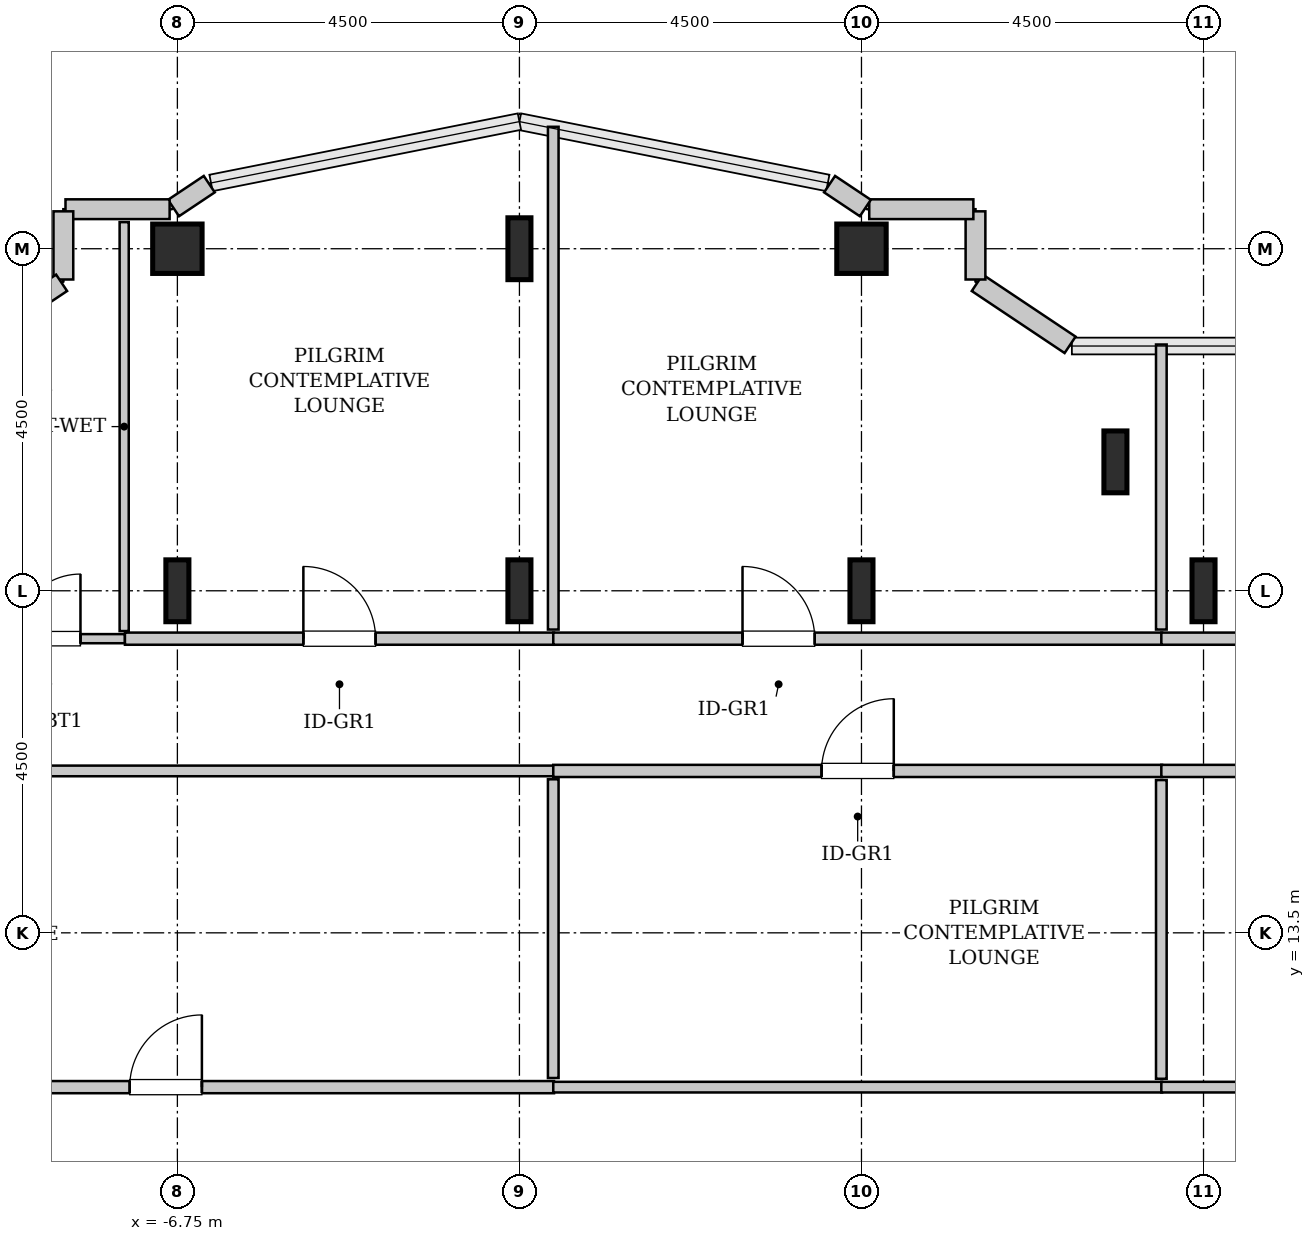
"""IFC4 building model, lengths in metres.
Left out: names, types, materials, properties, quantities, classifications, styles, units other than length and angle.
Written with IfcOpenShell. Run it as: python <this file> out.ifc"""

import sys

from ifc_helpers import new_model, si_unit, direction, frame, frame_2d, origin, origin_2d, place, context, subcontext, project, spatial, rectangle, hollow_rectangle, i_section, extrude, source, transform, mapped, element, fill, save


model = new_model("IFC4")
c1 = context("Model", 3, precision=1e-05, world=origin(), true_north=direction((0.0, 1.0)))
c2 = subcontext(c1, "Body", "Model", "MODEL_VIEW")
j1 = project(units=[si_unit("LENGTHUNIT", "METRE"), si_unit("PLANEANGLEUNIT", "RADIAN")], contexts=[c1])
p1 = place(None, origin())
s1 = spatial("IfcSite", under=j1, at=p1, CompositionType="ELEMENT")
p2 = place(p1, origin())
s2 = spatial("IfcBuilding", under=s1, at=p2, CompositionType="ELEMENT")
p3 = place(p2, frame((0.0, 0.0, 237.0)))
s3 = spatial("IfcBuildingStorey", under=s2, at=p3, CompositionType="ELEMENT", Elevation=237.0)
m1 = source(origin(), c2, "Body", "SweptSolid", [
    extrude(i_section(OverallWidth=0.303, OverallDepth=0.814, WebThickness=0.021, FlangeThickness=0.04, FilletRadius=0.03, at=origin_2d()), origin(), (0.0, 0.0, 1.0), 3.8),
])
p4 = place(p3, frame((-6.75, 18.0, 0.0), z_axis=(0.0, 0.0, 1.0), x_axis=(1.0, 0.0, 0.0)))
e1 = element("IfcColumn", 1, at=p4, inside=s3, PredefinedType="COLUMN", context=c2, shape_type="MappedRepresentation", body=[
    mapped(m1, transform((0.0, 0.0, 0.0), x_axis=(1.0, 0.0, 0.0), y_axis=(0.0, 1.0, 0.0), z_axis=(0.0, 0.0, 1.0), scale=1.0)),
])
m2 = source(origin(), c2, "Body", "SweptSolid", [
    extrude(hollow_rectangle(XDim=0.65, YDim=0.65, WallThickness=0.032, InnerFilletRadius=0.032, OuterFilletRadius=0.064, at=origin_2d()), origin(), (0.0, 0.0, 1.0), 3.8),
])
p5 = place(p3, frame((-6.75, 22.5, 0.0), z_axis=(0.0, 0.0, 1.0), x_axis=(1.0, 0.0, 0.0)))
e2 = element("IfcColumn", 2, at=p5, inside=s3, PredefinedType="COLUMN", context=c2, shape_type="MappedRepresentation", body=[
    mapped(m2, transform((0.0, 0.0, 0.0), x_axis=(1.0, 0.0, 0.0), y_axis=(0.0, 1.0, 0.0), z_axis=(0.0, 0.0, 1.0), scale=1.0)),
])
for number, where, z_axis, x_axis in (
    (3, (-2.25, 18.0, 0.0), (0.0, 0.0, 1.0), (1.0, 0.0, 0.0)),
    (4, (-2.25, 22.5, 0.0), (0.0, 0.0, 1.0), (1.0, 0.0, 0.0)),
    (5, (2.25, 18.0, 0.0), (0.0, 0.0, 1.0), (1.0, 0.0, 0.0)),
):
    element("IfcColumn", number, at=place(p3, frame(where, z_axis=z_axis, x_axis=x_axis)), inside=s3, PredefinedType="COLUMN", context=c2, shape_type="MappedRepresentation", body=[
        mapped(m1, transform((0.0, 0.0, 0.0), x_axis=(1.0, 0.0, 0.0), y_axis=(0.0, 1.0, 0.0), z_axis=(0.0, 0.0, 1.0), scale=1.0)),
    ])
p6 = place(p3, frame((2.25, 22.5, 0.0), z_axis=(0.0, 0.0, 1.0), x_axis=(1.0, 0.0, 0.0)))
e6 = element("IfcColumn", 6, at=p6, inside=s3, PredefinedType="COLUMN", context=c2, shape_type="MappedRepresentation", body=[
    mapped(m2, transform((0.0, 0.0, 0.0), x_axis=(1.0, 0.0, 0.0), y_axis=(0.0, 1.0, 0.0), z_axis=(0.0, 0.0, 1.0), scale=1.0)),
])
for number, where, z_axis, x_axis in (
    (7, (5.591, 19.696, 0.0), (0.0, 0.0, 1.0), (1.0, 0.0, 0.0)),
    (8, (6.75, 18.0, 0.0), (0.0, 0.0, 1.0), (1.0, 0.0, 0.0)),
):
    element("IfcColumn", number, at=place(p3, frame(where, z_axis=z_axis, x_axis=x_axis)), inside=s3, PredefinedType="COLUMN", context=c2, shape_type="MappedRepresentation", body=[
        mapped(m1, transform((0.0, 0.0, 0.0), x_axis=(1.0, 0.0, 0.0), y_axis=(0.0, 1.0, 0.0), z_axis=(0.0, 0.0, 1.0), scale=1.0)),
    ])
m3 = source(origin(), c2, "Body", "SweptSolid", [
    extrude(rectangle(XDim=1.469, YDim=0.26, at=frame_2d((0.734, 0.0))), origin(), (0.0, 0.0, 1.0), 3.55),
])
p7 = place(p3, frame((4.995, 21.236, 0.0), z_axis=(0.0, 0.0, 1.0), x_axis=(-0.831461760506, 0.555581983884, 0.0)))
e9 = element("IfcWall", 9, at=p7, inside=s3, PredefinedType="SOLIDWALL", context=c2, shape_type="MappedRepresentation", body=[
    mapped(m3, transform((0.0, 0.0, 0.0), x_axis=(1.0, 0.0, 0.0), y_axis=(0.0, 1.0, 0.0), z_axis=(0.0, 0.0, 1.0), scale=1.0)),
])
m4 = source(origin(), c2, "Body", "SweptSolid", [
    extrude(rectangle(XDim=0.897, YDim=0.26, at=frame_2d((0.448, 0.0))), origin(), (0.0, 0.0, 1.0), 3.55),
])
p8 = place(p3, frame((3.75, 22.095, 0.0), z_axis=(0.0, 0.0, 1.0), x_axis=(0.0, 1.0, 0.0)))
e10 = element("IfcWall", 10, at=p8, inside=s3, PredefinedType="SOLIDWALL", context=c2, shape_type="MappedRepresentation", body=[
    mapped(m4, transform((0.0, 0.0, 0.0), x_axis=(1.0, 0.0, 0.0), y_axis=(0.0, 1.0, 0.0), z_axis=(0.0, 0.0, 1.0), scale=1.0)),
])
m5 = source(origin(), c2, "Body", "SweptSolid", [
    extrude(rectangle(XDim=1.37, YDim=0.26, at=frame_2d((0.685, 0.0))), origin(), (0.0, 0.0, 1.0), 3.55),
])
p9 = place(p3, frame((3.722, 23.02, 0.0), z_axis=(0.0, 0.0, 1.0), x_axis=(-1.0, 0.0, 0.0)))
e11 = element("IfcWall", 11, at=p9, inside=s3, PredefinedType="SOLIDWALL", context=c2, shape_type="MappedRepresentation", body=[
    mapped(m5, transform((0.0, 0.0, 0.0), x_axis=(1.0, 0.0, 0.0), y_axis=(0.0, 1.0, 0.0), z_axis=(0.0, 0.0, 1.0), scale=1.0)),
])
m6 = source(origin(), c2, "Body", "SweptSolid", [
    extrude(rectangle(XDim=0.565, YDim=0.26, at=frame_2d((0.283, 0.0))), origin(), (0.0, 0.0, 1.0), 3.55),
])
for number, where, z_axis, x_axis in (
    (12, (2.301, 23.036, 0.0), (0.0, 0.0, 1.0), (-0.832, 0.555, 0.0)),
    (13, (-6.331, 23.35, 0.0), (0.0, 0.0, 1.0), (-0.832, -0.555, 0.0)),
):
    element("IfcWall", number, at=place(p3, frame(where, z_axis=z_axis, x_axis=x_axis)), inside=s3, PredefinedType="SOLIDWALL", context=c2, shape_type="MappedRepresentation", body=[
        mapped(m6, transform((0.0, 0.0, 0.0), x_axis=(1.0, 0.0, 0.0), y_axis=(0.0, 1.0, 0.0), z_axis=(0.0, 0.0, 1.0), scale=1.0)),
    ])
p10 = place(p3, frame((-6.852, 23.02, 0.0), z_axis=(0.0, 0.0, 1.0), x_axis=(-1.0, 0.0, 0.0)))
e14 = element("IfcWall", 14, at=p10, inside=s3, PredefinedType="SOLIDWALL", context=c2, shape_type="MappedRepresentation", body=[
    mapped(m5, transform((0.0, 0.0, 0.0), x_axis=(1.0, 0.0, 0.0), y_axis=(0.0, 1.0, 0.0), z_axis=(0.0, 0.0, 1.0), scale=1.0)),
])
p11 = place(p3, frame((-8.25, 22.992, 0.0), z_axis=(0.0, 0.0, 1.0), x_axis=(0.0, -1.0, 0.0)))
e15 = element("IfcWall", 15, at=p11, inside=s3, PredefinedType="SOLIDWALL", context=c2, shape_type="MappedRepresentation", body=[
    mapped(m4, transform((0.0, 0.0, 0.0), x_axis=(1.0, 0.0, 0.0), y_axis=(0.0, 1.0, 0.0), z_axis=(0.0, 0.0, 1.0), scale=1.0)),
])
p12 = place(p3, frame((-8.273, 22.052, 0.0), z_axis=(0.0, 0.0, 1.0), x_axis=(-0.831461760506, -0.555581983884, 0.0)))
e16 = element("IfcWall", 16, at=p12, inside=s3, PredefinedType="SOLIDWALL", context=c2, shape_type="MappedRepresentation", body=[
    mapped(m3, transform((0.0, 0.0, 0.0), x_axis=(1.0, 0.0, 0.0), y_axis=(0.0, 1.0, 0.0), z_axis=(0.0, 0.0, 1.0), scale=1.0)),
])
m7 = source(origin(), c2, "Body", "SweptSolid", [
    extrude(rectangle(XDim=2.02, YDim=0.12, at=frame_2d((1.01, 0.0))), origin(), (0.0, 0.0, 1.0), 3.535),
])
p13 = place(p3, frame((-9.46, 17.37, 0.0), z_axis=(0.0, 0.0, 1.0), x_axis=(1.0, 0.0, 0.0)))
e17 = element("IfcWall", 17, at=p13, inside=s3, PredefinedType="PLUMBINGWALL", context=c2, shape_type="MappedRepresentation", body=[
    mapped(m7, transform((0.0, 0.0, 0.0), x_axis=(1.0, 0.0, 0.0), y_axis=(0.0, 1.0, 0.0), z_axis=(0.0, 0.0, 1.0), scale=1.0)),
])
p14 = place(p13, frame((0.585, 0.0, 0.0)))
e18 = element("IfcOpeningElement", 18, at=p14, cuts=e17, PredefinedType="OPENING", context=c2, shape_type="SweptSolid", body=[
    extrude(rectangle(XDim=0.85, YDim=2.1, at=frame_2d((0.425, 1.05))), frame((0.0, 0.07, 0.0), z_axis=(0.0, -1.0, 0.0), x_axis=(1.0, 0.0, 0.0)), (0.0, 0.0, 1.0), 0.14),
])
m8 = source(origin(), c2, "Body", "SweptSolid", [
    extrude(rectangle(XDim=5.38, YDim=0.12, at=frame_2d((2.69, 0.0))), origin(), (0.0, 0.0, 1.0), 3.535),
])
p15 = place(p3, frame((-7.45, 17.47, 0.0), z_axis=(0.0, 0.0, 1.0), x_axis=(0.0, 1.0, 0.0)))
e19 = element("IfcWall", 19, at=p15, inside=s3, PredefinedType="PLUMBINGWALL", context=c2, shape_type="MappedRepresentation", body=[
    mapped(m8, transform((0.0, 0.0, 0.0), x_axis=(1.0, 0.0, 0.0), y_axis=(0.0, 1.0, 0.0), z_axis=(0.0, 0.0, 1.0), scale=1.0)),
])
m9 = source(origin(), c2, "Body", "SweptSolid", [
    extrude(rectangle(XDim=10.215, YDim=0.16, at=frame_2d((5.107, 0.0))), origin(), (0.0, 0.0, 1.0), 3.535),
])
p16 = place(p3, frame((-12.01, 11.47, 0.0), z_axis=(0.0, 0.0, 1.0), x_axis=(1.0, 0.0, 0.0)))
e20 = element("IfcWall", 20, at=p16, inside=s3, PredefinedType="PARTITIONING", context=c2, shape_type="MappedRepresentation", body=[
    mapped(m9, transform((0.0, 0.0, 0.0), x_axis=(1.0, 0.0, 0.0), y_axis=(0.0, 1.0, 0.0), z_axis=(0.0, 0.0, 1.0), scale=1.0)),
])
p17 = place(p16, frame((4.633, 0.0, 0.0)))
e21 = element("IfcOpeningElement", 21, at=p17, cuts=e20, PredefinedType="OPENING", context=c2, shape_type="SweptSolid", body=[
    extrude(rectangle(XDim=0.95, YDim=2.1, at=frame_2d((0.475, 1.05))), frame((0.0, 0.09, 0.0), z_axis=(0.0, -1.0, 0.0), x_axis=(1.0, 0.0, 0.0)), (0.0, 0.0, 1.0), 0.18),
])
m10 = source(origin(), c2, "Body", "SweptSolid", [
    extrude(rectangle(XDim=10.215, YDim=0.14, at=frame_2d((5.107, 0.0))), origin(), (0.0, 0.0, 1.0), 3.535),
])
p18 = place(p3, frame((-12.01, 15.63, 0.0), z_axis=(0.0, 0.0, 1.0), x_axis=(1.0, 0.0, 0.0)))
e22 = element("IfcWall", 22, at=p18, inside=s3, PredefinedType="PARTITIONING", context=c2, shape_type="MappedRepresentation", body=[
    mapped(m10, transform((0.0, 0.0, 0.0), x_axis=(1.0, 0.0, 0.0), y_axis=(0.0, 1.0, 0.0), z_axis=(0.0, 0.0, 1.0), scale=1.0)),
])
m11 = source(origin(), c2, "Body", "SweptSolid", [
    extrude(rectangle(XDim=3.93, YDim=0.14, at=frame_2d((1.965, 0.0))), origin(), (0.0, 0.0, 1.0), 3.535),
])
p19 = place(p3, frame((-1.805, 11.59, 0.0), z_axis=(0.0, 0.0, 1.0), x_axis=(0.0, 1.0, 0.0)))
e23 = element("IfcWall", 23, at=p19, inside=s3, PredefinedType="PARTITIONING", context=c2, shape_type="MappedRepresentation", body=[
    mapped(m11, transform((0.0, 0.0, 0.0), x_axis=(1.0, 0.0, 0.0), y_axis=(0.0, 1.0, 0.0), z_axis=(0.0, 0.0, 1.0), scale=1.0)),
])
m12 = source(origin(), c2, "Body", "SweptSolid", [
    extrude(rectangle(XDim=5.645, YDim=0.16, at=frame_2d((2.823, 0.0))), origin(), (0.0, 0.0, 1.0), 3.535),
])
p20 = place(p3, frame((-7.44, 17.37, 0.0), z_axis=(0.0, 0.0, 1.0), x_axis=(1.0, 0.0, 0.0)))
e24 = element("IfcWall", 24, at=p20, inside=s3, PredefinedType="PARTITIONING", context=c2, shape_type="MappedRepresentation", body=[
    mapped(m12, transform((0.0, 0.0, 0.0), x_axis=(1.0, 0.0, 0.0), y_axis=(0.0, 1.0, 0.0), z_axis=(0.0, 0.0, 1.0), scale=1.0)),
])
p21 = place(p20, frame((2.347, 0.0, 0.0)))
e25 = element("IfcOpeningElement", 25, at=p21, cuts=e24, PredefinedType="OPENING", context=c2, shape_type="SweptSolid", body=[
    extrude(rectangle(XDim=0.95, YDim=2.1, at=frame_2d((0.475, 1.05))), frame((0.0, 0.09, 0.0), z_axis=(0.0, -1.0, 0.0), x_axis=(1.0, 0.0, 0.0)), (0.0, 0.0, 1.0), 0.18),
])
m13 = source(origin(), c2, "Body", "SweptSolid", [
    extrude(rectangle(XDim=6.614, YDim=0.14, at=frame_2d((3.307, 0.0))), origin(), (0.0, 0.0, 1.0), 2.925),
])
p22 = place(p3, frame((-1.805, 17.49, 0.0), z_axis=(0.0, 0.0, 1.0), x_axis=(0.0, 1.0, 0.0)))
e26 = element("IfcWall", 26, at=p22, inside=s3, PredefinedType="PARTITIONING", context=c2, shape_type="MappedRepresentation", body=[
    mapped(m13, transform((0.0, 0.0, 0.0), x_axis=(1.0, 0.0, 0.0), y_axis=(0.0, 1.0, 0.0), z_axis=(0.0, 0.0, 1.0), scale=1.0)),
])
m14 = source(origin(), c2, "Body", "SweptSolid", [
    extrude(rectangle(XDim=8.01, YDim=0.16, at=frame_2d((4.005, 0.0))), origin(), (0.0, 0.0, 1.0), 3.535),
])
p23 = place(p3, frame((-1.805, 17.37, 0.0), z_axis=(0.0, 0.0, 1.0), x_axis=(1.0, 0.0, 0.0)))
e27 = element("IfcWall", 27, at=p23, inside=s3, PredefinedType="PARTITIONING", context=c2, shape_type="MappedRepresentation", body=[
    mapped(m14, transform((0.0, 0.0, 0.0), x_axis=(1.0, 0.0, 0.0), y_axis=(0.0, 1.0, 0.0), z_axis=(0.0, 0.0, 1.0), scale=1.0)),
])
p24 = place(p23, frame((2.49, 0.0, 0.0)))
e28 = element("IfcOpeningElement", 28, at=p24, cuts=e27, PredefinedType="OPENING", context=c2, shape_type="SweptSolid", body=[
    extrude(rectangle(XDim=0.95, YDim=2.1, at=frame_2d((0.475, 1.05))), frame((0.0, 0.09, 0.0), z_axis=(0.0, -1.0, 0.0), x_axis=(1.0, 0.0, 0.0)), (0.0, 0.0, 1.0), 0.18),
])
m15 = source(origin(), c2, "Body", "SweptSolid", [
    extrude(rectangle(XDim=3.75, YDim=0.14, at=frame_2d((1.875, 0.0))), origin(), (0.0, 0.0, 1.0), 3.535),
])
p25 = place(p3, frame((6.195, 17.49, 0.0), z_axis=(0.0, 0.0, 1.0), x_axis=(0.0, 1.0, 0.0)))
e29 = element("IfcWall", 29, at=p25, inside=s3, PredefinedType="PARTITIONING", context=c2, shape_type="MappedRepresentation", body=[
    mapped(m15, transform((0.0, 0.0, 0.0), x_axis=(1.0, 0.0, 0.0), y_axis=(0.0, 1.0, 0.0), z_axis=(0.0, 0.0, 1.0), scale=1.0)),
])
p26 = place(p3, frame((-1.805, 15.63, 0.0), z_axis=(0.0, 0.0, 1.0), x_axis=(1.0, 0.0, 0.0)))
e30 = element("IfcWall", 30, at=p26, inside=s3, PredefinedType="PARTITIONING", context=c2, shape_type="MappedRepresentation", body=[
    mapped(m14, transform((0.0, 0.0, 0.0), x_axis=(1.0, 0.0, 0.0), y_axis=(0.0, 1.0, 0.0), z_axis=(0.0, 0.0, 1.0), scale=1.0)),
])
p27 = place(p26, frame((3.53, 0.0, 0.0)))
e31 = element("IfcOpeningElement", 31, at=p27, cuts=e30, PredefinedType="OPENING", context=c2, shape_type="SweptSolid", body=[
    extrude(rectangle(XDim=0.95, YDim=2.1, at=frame_2d((0.475, 1.05))), frame((0.0, 0.09, 0.0), z_axis=(0.0, -1.0, 0.0), x_axis=(1.0, 0.0, 0.0)), (0.0, 0.0, 1.0), 0.18),
])
m16 = source(origin(), c2, "Body", "SweptSolid", [
    extrude(rectangle(XDim=8.01, YDim=0.14, at=frame_2d((4.005, 0.0))), origin(), (0.0, 0.0, 1.0), 3.535),
])
p28 = place(p3, frame((-1.805, 11.47, 0.0), z_axis=(0.0, 0.0, 1.0), x_axis=(1.0, 0.0, 0.0)))
e32 = element("IfcWall", 32, at=p28, inside=s3, PredefinedType="PARTITIONING", context=c2, shape_type="MappedRepresentation", body=[
    mapped(m16, transform((0.0, 0.0, 0.0), x_axis=(1.0, 0.0, 0.0), y_axis=(0.0, 1.0, 0.0), z_axis=(0.0, 0.0, 1.0), scale=1.0)),
])
p29 = place(p3, frame((6.195, 11.58, 0.0), z_axis=(0.0, 0.0, 1.0), x_axis=(0.0, 1.0, 0.0)))
e33 = element("IfcWall", 33, at=p29, inside=s3, PredefinedType="PARTITIONING", context=c2, shape_type="MappedRepresentation", body=[
    mapped(m11, transform((0.0, 0.0, 0.0), x_axis=(1.0, 0.0, 0.0), y_axis=(0.0, 1.0, 0.0), z_axis=(0.0, 0.0, 1.0), scale=1.0)),
])
m17 = source(origin(), c2, "Body", "SweptSolid", [
    extrude(rectangle(XDim=7.425, YDim=0.16, at=frame_2d((3.712, 0.0))), origin(), (0.0, 0.0, 1.0), 3.535),
])
p30 = place(p3, frame((6.195, 17.37, 0.0), z_axis=(0.0, 0.0, 1.0), x_axis=(1.0, 0.0, 0.0)))
e34 = element("IfcWall", 34, at=p30, inside=s3, PredefinedType="PARTITIONING", context=c2, shape_type="MappedRepresentation", body=[
    mapped(m17, transform((0.0, 0.0, 0.0), x_axis=(1.0, 0.0, 0.0), y_axis=(0.0, 1.0, 0.0), z_axis=(0.0, 0.0, 1.0), scale=1.0)),
])
p31 = place(p30, frame((3.238, 0.0, 0.0)))
e35 = element("IfcOpeningElement", 35, at=p31, cuts=e34, PredefinedType="OPENING", context=c2, shape_type="SweptSolid", body=[
    extrude(rectangle(XDim=0.95, YDim=2.1, at=frame_2d((0.475, 1.05))), frame((0.0, 0.09, 0.0), z_axis=(0.0, -1.0, 0.0), x_axis=(1.0, 0.0, 0.0)), (0.0, 0.0, 1.0), 0.18),
])
m18 = source(origin(), c2, "Body", "SweptSolid", [
    extrude(rectangle(XDim=5.815, YDim=0.16, at=frame_2d((2.907, 0.0))), origin(), (0.0, 0.0, 1.0), 3.535),
])
p32 = place(p3, frame((6.195, 15.63, 0.0), z_axis=(0.0, 0.0, 1.0), x_axis=(1.0, 0.0, 0.0)))
e36 = element("IfcWall", 36, at=p32, inside=s3, PredefinedType="PARTITIONING", context=c2, shape_type="MappedRepresentation", body=[
    mapped(m18, transform((0.0, 0.0, 0.0), x_axis=(1.0, 0.0, 0.0), y_axis=(0.0, 1.0, 0.0), z_axis=(0.0, 0.0, 1.0), scale=1.0)),
])
p33 = place(p32, frame((2.433, 0.0, 0.0)))
e37 = element("IfcOpeningElement", 37, at=p33, cuts=e36, PredefinedType="OPENING", context=c2, shape_type="SweptSolid", body=[
    extrude(rectangle(XDim=0.95, YDim=2.1, at=frame_2d((0.475, 1.05))), frame((0.0, 0.09, 0.0), z_axis=(0.0, -1.0, 0.0), x_axis=(1.0, 0.0, 0.0)), (0.0, 0.0, 1.0), 0.18),
])
m19 = source(origin(), c2, "Body", "SweptSolid", [
    extrude(rectangle(XDim=5.815, YDim=0.14, at=frame_2d((2.907, 0.0))), origin(), (0.0, 0.0, 1.0), 3.535),
])
p34 = place(p3, frame((6.195, 11.47, 0.0), z_axis=(0.0, 0.0, 1.0), x_axis=(1.0, 0.0, 0.0)))
e38 = element("IfcWall", 38, at=p34, inside=s3, PredefinedType="PARTITIONING", context=c2, shape_type="MappedRepresentation", body=[
    mapped(m19, transform((0.0, 0.0, 0.0), x_axis=(1.0, 0.0, 0.0), y_axis=(0.0, 1.0, 0.0), z_axis=(0.0, 0.0, 1.0), scale=1.0)),
])
m20 = source(origin(), c2, "Body", "SweptSolid", [
    extrude(rectangle(XDim=0.85, YDim=2.1, at=frame_2d((0.425, 1.05))), frame((0.0, 0.025, 0.0), z_axis=(0.0, -1.0, 0.0), x_axis=(1.0, 0.0, 0.0)), (0.0, 0.0, 1.0), 0.05),
])
p35 = place(p14, origin())
e39 = element("IfcDoor", 39, at=p35, inside=s3, OperationType="SINGLE_SWING_RIGHT", PredefinedType="DOOR", context=c2, shape_type="MappedRepresentation", body=[
    mapped(m20, transform((0.0, 0.0, 0.0), x_axis=(1.0, 0.0, 0.0), y_axis=(0.0, 1.0, 0.0), z_axis=(0.0, 0.0, 1.0), scale=1.0)),
])
fill(e18, e39)
m21 = source(origin(), c2, "Body", "SweptSolid", [
    extrude(rectangle(XDim=0.95, YDim=2.1, at=frame_2d((0.475, 1.05))), frame((0.0, 0.025, 0.0), z_axis=(0.0, -1.0, 0.0), x_axis=(1.0, 0.0, 0.0)), (0.0, 0.0, 1.0), 0.05),
])
p36 = place(p17, origin())
e40 = element("IfcDoor", 40, at=p36, inside=s3, OperationType="SINGLE_SWING_RIGHT", PredefinedType="DOOR", context=c2, shape_type="MappedRepresentation", body=[
    mapped(m21, transform((0.0, 0.0, 0.0), x_axis=(1.0, 0.0, 0.0), y_axis=(0.0, 1.0, 0.0), z_axis=(0.0, 0.0, 1.0), scale=1.0)),
])
fill(e21, e40)
p37 = place(p21, origin())
e41 = element("IfcDoor", 41, at=p37, inside=s3, OperationType="SINGLE_SWING_LEFT", PredefinedType="DOOR", context=c2, shape_type="MappedRepresentation", body=[
    mapped(m21, transform((0.0, 0.0, 0.0), x_axis=(1.0, 0.0, 0.0), y_axis=(0.0, 1.0, 0.0), z_axis=(0.0, 0.0, 1.0), scale=1.0)),
])
fill(e25, e41)
p38 = place(p24, origin())
e42 = element("IfcDoor", 42, at=p38, inside=s3, OperationType="SINGLE_SWING_LEFT", PredefinedType="DOOR", context=c2, shape_type="MappedRepresentation", body=[
    mapped(m21, transform((0.0, 0.0, 0.0), x_axis=(1.0, 0.0, 0.0), y_axis=(0.0, 1.0, 0.0), z_axis=(0.0, 0.0, 1.0), scale=1.0)),
])
fill(e28, e42)
p39 = place(p27, origin())
e43 = element("IfcDoor", 43, at=p39, inside=s3, OperationType="SINGLE_SWING_RIGHT", PredefinedType="DOOR", context=c2, shape_type="MappedRepresentation", body=[
    mapped(m21, transform((0.0, 0.0, 0.0), x_axis=(1.0, 0.0, 0.0), y_axis=(0.0, 1.0, 0.0), z_axis=(0.0, 0.0, 1.0), scale=1.0)),
])
fill(e31, e43)
save(model, sys.argv[1])
